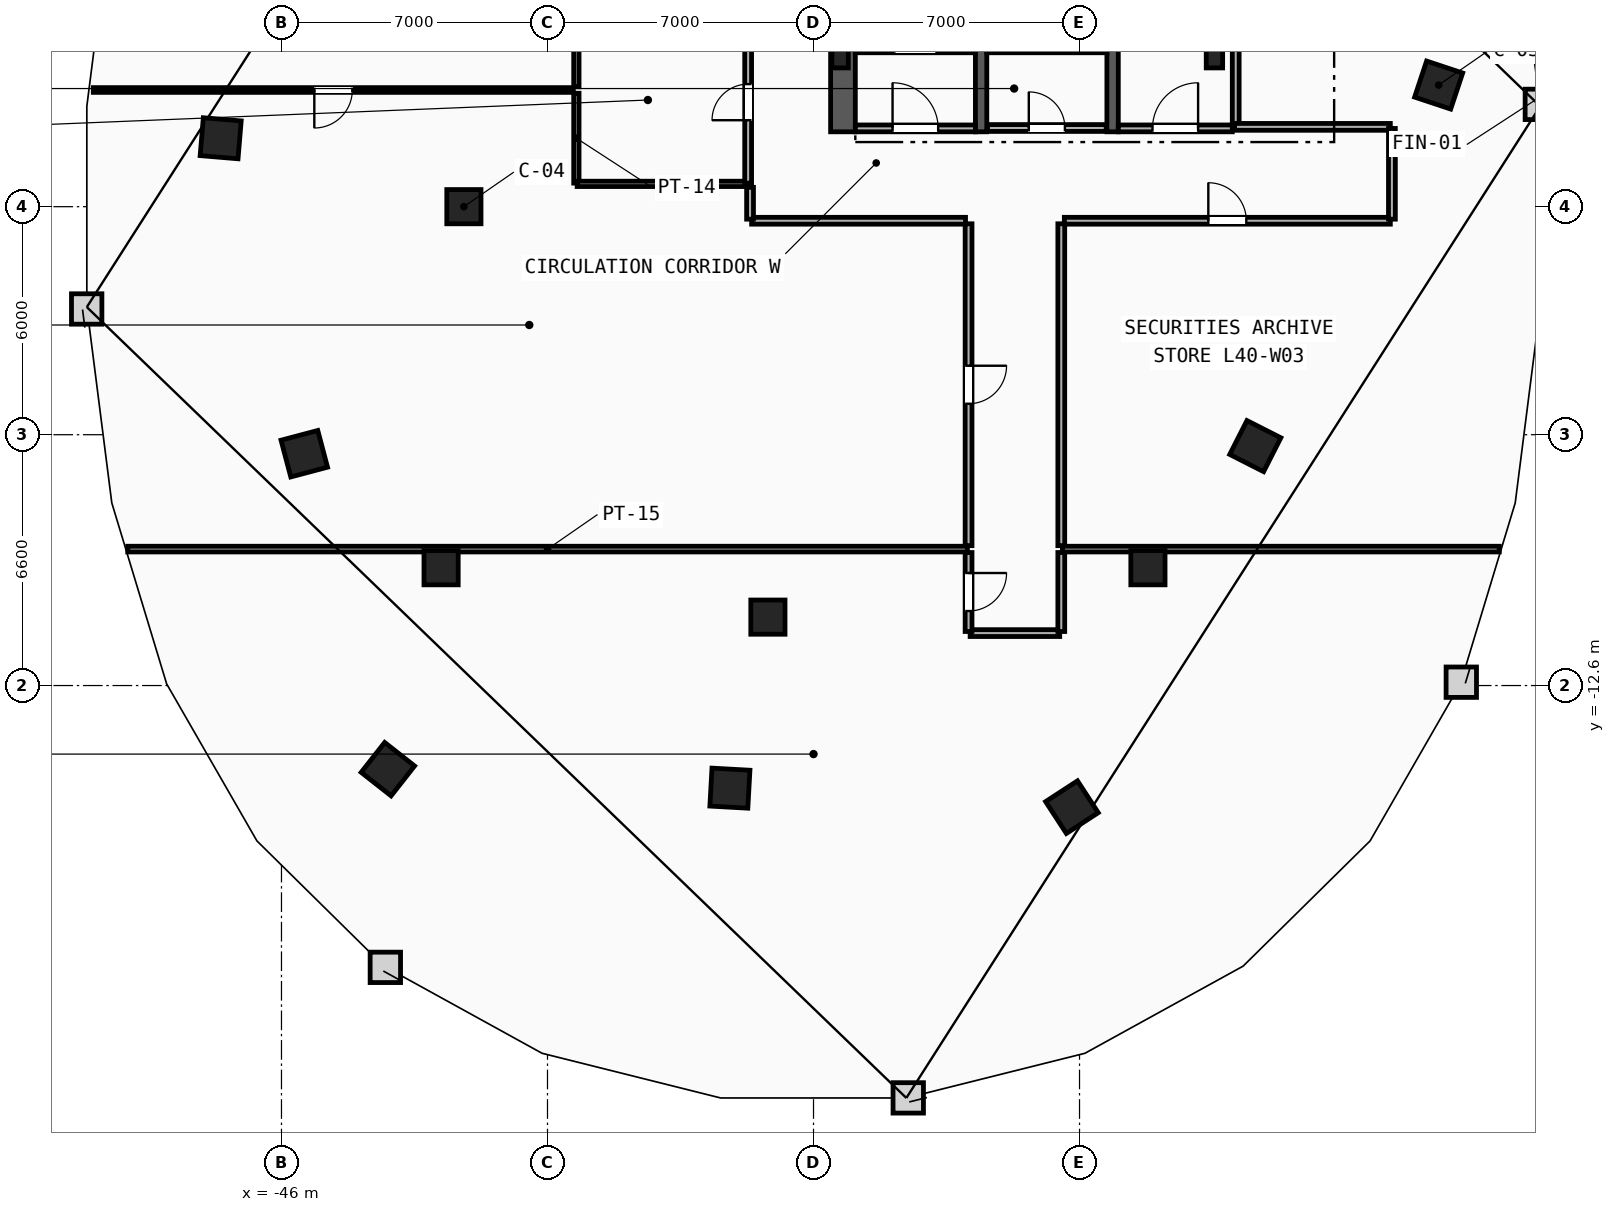
"""IFC4 building model, lengths in metres.
Left out: names, types, materials, properties, quantities, classifications, styles, units other than length and angle.
Written with IfcOpenShell. Run it as: python <this file> out.ifc"""

import sys

from ifc_helpers import new_model, si_unit, direction, frame, frame_2d, origin, origin_2d, place, context, subcontext, project, spatial, rectangle, i_section, extrude, element, fill, save


model = new_model("IFC4")
c1 = context("Model", 3, precision=1e-05, world=origin(), true_north=direction((0.0, 1.0)))
c2 = subcontext(c1, "Body", "Model", "MODEL_VIEW")
j1 = project(units=[si_unit("LENGTHUNIT", "METRE"), si_unit("PLANEANGLEUNIT", "RADIAN")], contexts=[c1])
p1 = place(None, origin())
s1 = spatial("IfcSite", under=j1, at=p1, CompositionType="ELEMENT")
p2 = place(p1, origin())
s2 = spatial("IfcBuilding", under=s1, at=p2, CompositionType="ELEMENT")
p3 = place(p2, frame((0.0, 0.0, 154.8)))
s3 = spatial("IfcBuildingStorey", under=s2, at=p3, CompositionType="ELEMENT", Elevation=154.8)
for number, where, z_axis, x_axis in (
    (1, (-31.3, 3.9, 0.0), (0.0, 0.0, 1.0), (1.0, 0.0, 0.0)),
    (2, (-21.45, 3.9, 0.0), (0.0, 0.0, 1.0), (1.0, 0.0, 0.0)),
):
    element("IfcColumn", number, at=place(p3, frame(where, z_axis=z_axis, x_axis=x_axis)), inside=s3, PredefinedType="COLUMN", context=c2, shape_type="SweptSolid", body=[
        extrude(i_section(OverallWidth=0.432, OverallDepth=0.498, WebThickness=0.056, FlangeThickness=0.089, FilletRadius=0.018, at=origin_2d()), origin(), (0.0, 0.0, 1.0), 3.6),
    ])
for number, where, z_axis, x_axis in (
    (3, (-41.2, 0.0, 0.0), (0.0, 0.0, 1.0), (1.0, 0.0, 0.0)),
    (4, (-41.8, -9.5, 0.0), (0.0, 0.0, 1.0), (1.0, 0.0, 0.0)),
    (5, (-33.2, -10.8, 0.0), (0.0, 0.0, 1.0), (1.0, 0.0, 0.0)),
    (6, (-23.2, -9.5, 0.0), (0.0, 0.0, 1.0), (1.0, 0.0, 0.0)),
):
    element("IfcColumn", number, at=place(p3, frame(where, z_axis=z_axis, x_axis=x_axis)), inside=s3, PredefinedType="COLUMN", context=c2, shape_type="SweptSolid", body=[
        extrude(rectangle(XDim=0.9, YDim=0.9, at=origin_2d()), origin(), (0.0, 0.0, 1.0), 3.6),
    ])
for number, where, z_axis, x_axis in (
    (7, (-15.55, 3.2, 0.0), (0.0, 0.0, 1.0), (0.315, 0.949, 0.0)),
    (8, (-47.6, 1.8, 0.0), (0.0, 0.0, 1.0), (-0.084, -0.997, 0.0)),
    (9, (-45.4, -6.5, 0.0), (0.0, 0.0, 1.0), (0.256, -0.967, 0.0)),
    (10, (-43.2, -14.8, 0.0), (0.0, 0.0, 1.0), (0.786, -0.618, 0.0)),
    (11, (-34.2, -15.3, 0.0), (0.0, 0.0, 1.0), (0.998, -0.055, 0.0)),
    (12, (-25.2, -15.8, 0.0), (0.0, 0.0, 1.0), (0.838, 0.546, 0.0)),
    (13, (-20.375, -6.3, 0.0), (0.0, 0.0, 1.0), (0.453, 0.892, 0.0)),
):
    element("IfcColumn", number, at=place(p3, frame(where, z_axis=z_axis, x_axis=x_axis)), inside=s3, PredefinedType="COLUMN", context=c2, shape_type="SweptSolid", body=[
        extrude(rectangle(XDim=1.0, YDim=1.0, at=origin_2d()), origin(), (0.0, 0.0, 1.0), 3.6),
    ])
p4 = place(p3, frame((-31.225, 1.97, 0.0), z_axis=(0.0, 0.0, 1.0), x_axis=(0.0, 1.0, 0.0)))
e14 = element("IfcWall", 14, at=p4, inside=s3, PredefinedType="SHEAR", context=c2, shape_type="SweptSolid", body=[
    extrude(rectangle(XDim=13.33, YDim=0.65, at=frame_2d((6.665, 0.0))), origin(), (0.0, 0.0, 1.0), 3.36),
])
for number, where, z_axis, x_axis in (
    (15, (-27.59, 1.97, 0.0), (0.0, 0.0, 1.0), (0.0, 1.0, 0.0)),
    (16, (-24.13, 1.97, 0.0), (0.0, 0.0, 1.0), (0.0, 1.0, 0.0)),
):
    element("IfcWall", number, at=place(p3, frame(where, z_axis=z_axis, x_axis=x_axis)), inside=s3, PredefinedType="SHEAR", context=c2, shape_type="SweptSolid", body=[
        extrude(rectangle(XDim=10.68, YDim=0.3, at=frame_2d((5.34, 0.0))), origin(), (0.0, 0.0, 1.0), 3.36),
    ])
p5 = place(p3, frame((-30.9, 4.2, 0.0), z_axis=(0.0, 0.0, 1.0), x_axis=(1.0, 0.0, 0.0)))
e17 = element("IfcWall", 17, at=p5, inside=s3, PredefinedType="SHEAR", context=c2, shape_type="SweptSolid", body=[
    extrude(rectangle(XDim=3.16, YDim=0.3, at=frame_2d((1.58, 0.0))), origin(), (0.0, 0.0, 1.0), 3.36),
])
p6 = place(p5, frame((1.03, 0.0, 0.0)))
e18 = element("IfcOpeningElement", 18, at=p6, cuts=e17, PredefinedType="OPENING", context=c2, shape_type="SweptSolid", body=[
    extrude(rectangle(XDim=1.1, YDim=2.15, at=frame_2d((0.55, 1.075))), frame((0.0, 0.16, 0.0), z_axis=(0.0, -1.0, 0.0), x_axis=(1.0, 0.0, 0.0)), (0.0, 0.0, 1.0), 0.32),
])
p7 = place(p3, frame((-27.44, 4.2, 0.0), z_axis=(0.0, 0.0, 1.0), x_axis=(1.0, 0.0, 0.0)))
e19 = element("IfcWall", 19, at=p7, inside=s3, PredefinedType="SHEAR", context=c2, shape_type="SweptSolid", body=[
    extrude(rectangle(XDim=3.16, YDim=0.3, at=frame_2d((1.58, 0.0))), origin(), (0.0, 0.0, 1.0), 3.36),
])
p8 = place(p3, frame((-20.89, 2.15, 0.0), z_axis=(0.0, 0.0, 1.0), x_axis=(0.0, 1.0, 0.0)))
e20 = element("IfcWall", 20, at=p8, inside=s3, PredefinedType="PARTITIONING", context=c2, shape_type="SweptSolid", body=[
    extrude(rectangle(XDim=5.3, YDim=0.18, at=frame_2d((2.65, 0.0))), origin(), (0.0, 0.0, 1.0), 3.36),
])
p9 = place(p3, frame((-23.98, 2.06, 0.0), z_axis=(0.0, 0.0, 1.0), x_axis=(1.0, 0.0, 0.0)))
e21 = element("IfcWall", 21, at=p9, inside=s3, PredefinedType="PARTITIONING", context=c2, shape_type="SweptSolid", body=[
    extrude(rectangle(XDim=3.0, YDim=0.18, at=frame_2d((1.5, 0.0))), origin(), (0.0, 0.0, 1.0), 3.36),
])
p10 = place(p9, frame((0.9, 0.0, 0.0)))
e22 = element("IfcOpeningElement", 22, at=p10, cuts=e21, PredefinedType="OPENING", context=c2, shape_type="SweptSolid", body=[
    extrude(rectangle(XDim=1.2, YDim=2.15, at=frame_2d((0.6, 1.075))), frame((0.0, 0.1, 0.0), z_axis=(0.0, -1.0, 0.0), x_axis=(1.0, 0.0, 0.0)), (0.0, 0.0, 1.0), 0.2),
])
p11 = place(p3, frame((-30.9, 2.06, 0.0), z_axis=(0.0, 0.0, 1.0), x_axis=(1.0, 0.0, 0.0)))
e23 = element("IfcWall", 23, at=p11, inside=s3, PredefinedType="PARTITIONING", context=c2, shape_type="SweptSolid", body=[
    extrude(rectangle(XDim=3.16, YDim=0.18, at=frame_2d((1.58, 0.0))), origin(), (0.0, 0.0, 1.0), 3.36),
])
p12 = place(p11, frame((0.98, 0.0, 0.0)))
e24 = element("IfcOpeningElement", 24, at=p12, cuts=e23, PredefinedType="OPENING", context=c2, shape_type="SweptSolid", body=[
    extrude(rectangle(XDim=1.2, YDim=2.15, at=frame_2d((0.6, 1.075))), frame((0.0, 0.1, 0.0), z_axis=(0.0, -1.0, 0.0), x_axis=(1.0, 0.0, 0.0)), (0.0, 0.0, 1.0), 0.2),
])
p13 = place(p3, frame((-27.42, 2.07, 0.0), z_axis=(0.0, 0.0, 1.0), x_axis=(1.0, 0.0, 0.0)))
e25 = element("IfcWall", 25, at=p13, inside=s3, PredefinedType="PARTITIONING", context=c2, shape_type="SweptSolid", body=[
    extrude(rectangle(XDim=3.12, YDim=0.18, at=frame_2d((1.56, 0.0))), origin(), (0.0, 0.0, 1.0), 3.36),
])
p14 = place(p13, frame((1.085, 0.0, 0.0)))
e26 = element("IfcOpeningElement", 26, at=p14, cuts=e25, PredefinedType="OPENING", context=c2, shape_type="SweptSolid", body=[
    extrude(rectangle(XDim=0.95, YDim=2.1, at=frame_2d((0.475, 1.05))), frame((0.0, 0.1, 0.0), z_axis=(0.0, -1.0, 0.0), x_axis=(1.0, 0.0, 0.0)), (0.0, 0.0, 1.0), 0.2),
])
p15 = place(p3, frame((-38.24, 0.62, 0.0), z_axis=(0.0, 0.0, 1.0), x_axis=(0.0, 1.0, 0.0)))
e27 = element("IfcWall", 27, at=p15, inside=s3, PredefinedType="PARTITIONING", context=c2, shape_type="SweptSolid", body=[
    extrude(rectangle(XDim=2.365, YDim=0.14, at=frame_2d((1.183, 0.0))), origin(), (0.0, 0.0, 1.0), 3.36),
])
p16 = place(p3, frame((-38.24, 3.155, 0.0), z_axis=(0.0, 0.0, 1.0), x_axis=(0.0, 1.0, 0.0)))
e28 = element("IfcWall", 28, at=p16, inside=s3, PredefinedType="PARTITIONING", context=c2, shape_type="SweptSolid", body=[
    extrude(rectangle(XDim=1.74, YDim=0.14, at=frame_2d((0.87, 0.0))), origin(), (0.0, 0.0, 1.0), 3.36),
])
p17 = place(p3, frame((-38.22, 0.6, 0.0), z_axis=(0.0, 0.0, 1.0), x_axis=(1.0, 0.0, 0.0)))
e29 = element("IfcWall", 29, at=p17, inside=s3, PredefinedType="PARTITIONING", context=c2, shape_type="SweptSolid", body=[
    extrude(rectangle(XDim=4.48, YDim=0.14, at=frame_2d((2.24, 0.0))), origin(), (0.0, 0.0, 1.0), 3.36),
])
p18 = place(p3, frame((-33.72, 0.62, 0.0), z_axis=(0.0, 0.0, 1.0), x_axis=(0.0, 1.0, 0.0)))
e30 = element("IfcWall", 30, at=p18, inside=s3, PredefinedType="PARTITIONING", context=c2, shape_type="SweptSolid", body=[
    extrude(rectangle(XDim=4.26, YDim=0.18, at=frame_2d((2.13, 0.0))), origin(), (0.0, 0.0, 1.0), 3.36),
])
p19 = place(p18, frame((1.655, 0.0, 0.0)))
e31 = element("IfcOpeningElement", 31, at=p19, cuts=e30, PredefinedType="OPENING", context=c2, shape_type="SweptSolid", body=[
    extrude(rectangle(XDim=0.95, YDim=2.1, at=frame_2d((0.475, 1.05))), frame((0.0, 0.1, 0.0), z_axis=(0.0, -1.0, 0.0), x_axis=(1.0, 0.0, 0.0)), (0.0, 0.0, 1.0), 0.2),
])
p20 = place(p3, frame((-50.045, -9.01, 0.0), z_axis=(0.0, 0.0, 1.0), x_axis=(1.0, 0.0, 0.0)))
e32 = element("IfcWall", 32, at=p20, inside=s3, PredefinedType="PARTITIONING", context=c2, shape_type="SweptSolid", body=[
    extrude(rectangle(XDim=22.095, YDim=0.15, at=frame_2d((11.048, 0.0))), origin(), (0.0, 0.0, 1.0), 3.36),
])
p21 = place(p3, frame((-25.45, -9.01, 0.0), z_axis=(0.0, 0.0, 1.0), x_axis=(1.0, 0.0, 0.0)))
e33 = element("IfcWall", 33, at=p21, inside=s3, PredefinedType="PARTITIONING", context=c2, shape_type="SweptSolid", body=[
    extrude(rectangle(XDim=11.495, YDim=0.15, at=frame_2d((5.748, 0.0))), origin(), (0.0, 0.0, 1.0), 3.36),
])
p22 = place(p3, frame((-27.878, -11.22, 0.0), z_axis=(0.0, 0.0, 1.0), x_axis=(1.0, 0.0, 0.0)))
e34 = element("IfcWall", 34, at=p22, inside=s3, PredefinedType="PARTITIONING", context=c2, shape_type="SweptSolid", body=[
    extrude(rectangle(XDim=2.357, YDim=0.18, at=frame_2d((1.178, 0.0))), origin(), (0.0, 0.0, 1.0), 3.36),
])
p23 = place(p3, frame((-27.92, -9.1, 0.0), z_axis=(0.0, 0.0, 1.0), x_axis=(0.0, -1.0, 0.0)))
e35 = element("IfcWall", 35, at=p23, inside=s3, PredefinedType="PARTITIONING", context=c2, shape_type="SweptSolid", body=[
    extrude(rectangle(XDim=2.078, YDim=0.18, at=frame_2d((1.039, 0.0))), origin(), (0.0, 0.0, 1.0), 3.36),
])
p24 = place(p23, frame((0.539, 0.0, 0.0)))
e36 = element("IfcOpeningElement", 36, at=p24, cuts=e35, PredefinedType="OPENING", context=c2, shape_type="SweptSolid", body=[
    extrude(rectangle(XDim=1.0, YDim=2.15, at=frame_2d((0.5, 1.075))), frame((0.0, 0.1, 0.0), z_axis=(0.0, -1.0, 0.0), x_axis=(1.0, 0.0, 0.0)), (0.0, 0.0, 1.0), 0.2),
])
p25 = place(p3, frame((-25.48, -11.178, 0.0), z_axis=(0.0, 0.0, 1.0), x_axis=(0.0, 1.0, 0.0)))
e37 = element("IfcWall", 37, at=p25, inside=s3, PredefinedType="PARTITIONING", context=c2, shape_type="SweptSolid", body=[
    extrude(rectangle(XDim=2.078, YDim=0.18, at=frame_2d((1.039, 0.0))), origin(), (0.0, 0.0, 1.0), 3.36),
])
p26 = place(p3, frame((-27.92, -0.45, 0.0), z_axis=(0.0, 0.0, 1.0), x_axis=(0.0, -1.0, 0.0)))
e38 = element("IfcWall", 38, at=p26, inside=s3, PredefinedType="PARTITIONING", context=c2, shape_type="SweptSolid", body=[
    extrude(rectangle(XDim=8.47, YDim=0.18, at=frame_2d((4.235, 0.0))), origin(), (0.0, 0.0, 1.0), 3.36),
])
p27 = place(p26, frame((3.735, 0.0, 0.0)))
e39 = element("IfcOpeningElement", 39, at=p27, cuts=e38, PredefinedType="OPENING", context=c2, shape_type="SweptSolid", body=[
    extrude(rectangle(XDim=1.0, YDim=2.15, at=frame_2d((0.5, 1.075))), frame((0.0, 0.1, 0.0), z_axis=(0.0, -1.0, 0.0), x_axis=(1.0, 0.0, 0.0)), (0.0, 0.0, 1.0), 0.2),
])
p28 = place(p3, frame((-33.628, -0.37, 0.0), z_axis=(0.0, 0.0, 1.0), x_axis=(1.0, 0.0, 0.0)))
e40 = element("IfcWall", 40, at=p28, inside=s3, PredefinedType="PARTITIONING", context=c2, shape_type="SweptSolid", body=[
    extrude(rectangle(XDim=5.628, YDim=0.18, at=frame_2d((2.814, 0.0))), origin(), (0.0, 0.0, 1.0), 3.36),
])
p29 = place(p3, frame((-33.67, 0.509, 0.0), z_axis=(0.0, 0.0, 1.0), x_axis=(0.0, -1.0, 0.0)))
e41 = element("IfcWall", 41, at=p29, inside=s3, PredefinedType="PARTITIONING", context=c2, shape_type="SweptSolid", body=[
    extrude(rectangle(XDim=0.837, YDim=0.18, at=frame_2d((0.418, 0.0))), origin(), (0.0, 0.0, 1.0), 3.36),
])
p30 = place(p3, frame((-25.4, -0.37, 0.0), z_axis=(0.0, 0.0, 1.0), x_axis=(1.0, 0.0, 0.0)))
e42 = element("IfcWall", 42, at=p30, inside=s3, PredefinedType="PARTITIONING", context=c2, shape_type="SweptSolid", body=[
    extrude(rectangle(XDim=8.578, YDim=0.18, at=frame_2d((4.289, 0.0))), origin(), (0.0, 0.0, 1.0), 3.36),
])
p31 = place(p30, frame((3.789, 0.0, 0.0)))
e43 = element("IfcOpeningElement", 43, at=p31, cuts=e42, PredefinedType="OPENING", context=c2, shape_type="SweptSolid", body=[
    extrude(rectangle(XDim=1.0, YDim=2.15, at=frame_2d((0.5, 1.075))), frame((0.0, 0.1, 0.0), z_axis=(0.0, -1.0, 0.0), x_axis=(1.0, 0.0, 0.0)), (0.0, 0.0, 1.0), 0.2),
])
p32 = place(p3, frame((-25.48, -8.92, 0.0), z_axis=(0.0, 0.0, 1.0), x_axis=(0.0, 1.0, 0.0)))
e44 = element("IfcWall", 44, at=p32, inside=s3, PredefinedType="PARTITIONING", context=c2, shape_type="SweptSolid", body=[
    extrude(rectangle(XDim=8.47, YDim=0.18, at=frame_2d((4.235, 0.0))), origin(), (0.0, 0.0, 1.0), 3.36),
])
p33 = place(p3, frame((-16.822, 2.1, 0.0), z_axis=(0.0, 0.0, 1.0), x_axis=(-1.0, 0.0, 0.0)))
e45 = element("IfcWall", 45, at=p33, inside=s3, PredefinedType="PARTITIONING", context=c2, shape_type="SweptSolid", body=[
    extrude(rectangle(XDim=4.098, YDim=0.18, at=frame_2d((2.049, 0.0))), origin(), (0.0, 0.0, 1.0), 3.36),
])
p34 = place(p3, frame((-16.78, -0.329, 0.0), z_axis=(0.0, 0.0, 1.0), x_axis=(0.0, 1.0, 0.0)))
e46 = element("IfcWall", 46, at=p34, inside=s3, PredefinedType="PARTITIONING", context=c2, shape_type="SweptSolid", body=[
    extrude(rectangle(XDim=2.387, YDim=0.18, at=frame_2d((1.194, 0.0))), origin(), (0.0, 0.0, 1.0), 3.36),
])
p35 = place(p3, frame((-38.32, 3.07, 0.0), z_axis=(0.0, 0.0, 1.0), x_axis=(-1.0, 0.0, 0.0)))
e47 = element("IfcWall", 47, at=p35, inside=s3, PredefinedType="PARTITIONING", context=c2, shape_type="SweptSolid", body=[
    extrude(rectangle(XDim=12.631, YDim=0.125, at=frame_2d((6.316, 0.0))), origin(), (0.0, 0.0, 1.0), 3.36),
])
p36 = place(p35, frame((5.816, 0.0, 0.0)))
e48 = element("IfcOpeningElement", 48, at=p36, cuts=e47, PredefinedType="OPENING", context=c2, shape_type="SweptSolid", body=[
    extrude(rectangle(XDim=1.0, YDim=2.15, at=frame_2d((0.5, 1.075))), frame((0.0, 0.073, 0.0), z_axis=(0.0, -1.0, 0.0), x_axis=(1.0, 0.0, 0.0)), (0.0, 0.0, 1.0), 0.145),
])
p37 = place(p10, origin())
e49 = element("IfcDoor", 49, at=p37, inside=s3, OperationType="SINGLE_SWING_RIGHT", PredefinedType="DOOR", context=c2, shape_type="SweptSolid", body=[
    extrude(rectangle(XDim=1.2, YDim=2.15, at=frame_2d((0.6, 1.075))), frame((0.0, 0.025, 0.0), z_axis=(0.0, -1.0, 0.0), x_axis=(1.0, 0.0, 0.0)), (0.0, 0.0, 1.0), 0.05),
])
fill(e22, e49)
p38 = place(p12, origin())
e50 = element("IfcDoor", 50, at=p38, inside=s3, OperationType="SINGLE_SWING_LEFT", PredefinedType="DOOR", context=c2, shape_type="SweptSolid", body=[
    extrude(rectangle(XDim=1.2, YDim=2.15, at=frame_2d((0.6, 1.075))), frame((0.0, 0.025, 0.0), z_axis=(0.0, -1.0, 0.0), x_axis=(1.0, 0.0, 0.0)), (0.0, 0.0, 1.0), 0.05),
])
fill(e24, e50)
p39 = place(p36, origin())
e51 = element("IfcDoor", 51, at=p39, inside=s3, OperationType="SINGLE_SWING_RIGHT", PredefinedType="DOOR", context=c2, shape_type="SweptSolid", body=[
    extrude(rectangle(XDim=1.0, YDim=2.15, at=frame_2d((0.5, 1.075))), frame((0.0, 0.025, 0.0), z_axis=(0.0, -1.0, 0.0), x_axis=(1.0, 0.0, 0.0)), (0.0, 0.0, 1.0), 0.05),
])
fill(e48, e51)
p40 = place(p31, origin())
e52 = element("IfcDoor", 52, at=p40, inside=s3, OperationType="SINGLE_SWING_LEFT", PredefinedType="DOOR", context=c2, shape_type="SweptSolid", body=[
    extrude(rectangle(XDim=1.0, YDim=2.15, at=frame_2d((0.5, 1.075))), frame((0.0, 0.025, 0.0), z_axis=(0.0, -1.0, 0.0), x_axis=(1.0, 0.0, 0.0)), (0.0, 0.0, 1.0), 0.05),
])
fill(e43, e52)
p41 = place(p27, origin())
e53 = element("IfcDoor", 53, at=p41, inside=s3, OperationType="SINGLE_SWING_LEFT", PredefinedType="DOOR", context=c2, shape_type="SweptSolid", body=[
    extrude(rectangle(XDim=1.0, YDim=2.15, at=frame_2d((0.5, 1.075))), frame((0.0, 0.025, 0.0), z_axis=(0.0, -1.0, 0.0), x_axis=(1.0, 0.0, 0.0)), (0.0, 0.0, 1.0), 0.05),
])
fill(e39, e53)
p42 = place(p19, origin())
e54 = element("IfcDoor", 54, at=p42, inside=s3, OperationType="SINGLE_SWING_LEFT", PredefinedType="DOOR", context=c2, shape_type="SweptSolid", body=[
    extrude(rectangle(XDim=0.95, YDim=2.1, at=frame_2d((0.475, 1.05))), frame((0.0, 0.025, 0.0), z_axis=(0.0, -1.0, 0.0), x_axis=(1.0, 0.0, 0.0)), (0.0, 0.0, 1.0), 0.05),
])
fill(e31, e54)
p43 = place(p14, origin())
e55 = element("IfcDoor", 55, at=p43, inside=s3, OperationType="SINGLE_SWING_LEFT", PredefinedType="DOOR", context=c2, shape_type="SweptSolid", body=[
    extrude(rectangle(XDim=0.95, YDim=2.1, at=frame_2d((0.475, 1.05))), frame((0.0, 0.025, 0.0), z_axis=(0.0, -1.0, 0.0), x_axis=(1.0, 0.0, 0.0)), (0.0, 0.0, 1.0), 0.05),
])
fill(e26, e55)
p44 = place(p24, origin())
e56 = element("IfcDoor", 56, at=p44, inside=s3, OperationType="SINGLE_SWING_LEFT", PredefinedType="DOOR", context=c2, shape_type="SweptSolid", body=[
    extrude(rectangle(XDim=1.0, YDim=2.15, at=frame_2d((0.5, 1.075))), frame((0.0, 0.025, 0.0), z_axis=(0.0, -1.0, 0.0), x_axis=(1.0, 0.0, 0.0)), (0.0, 0.0, 1.0), 0.05),
])
fill(e36, e56)
save(model, sys.argv[1])
